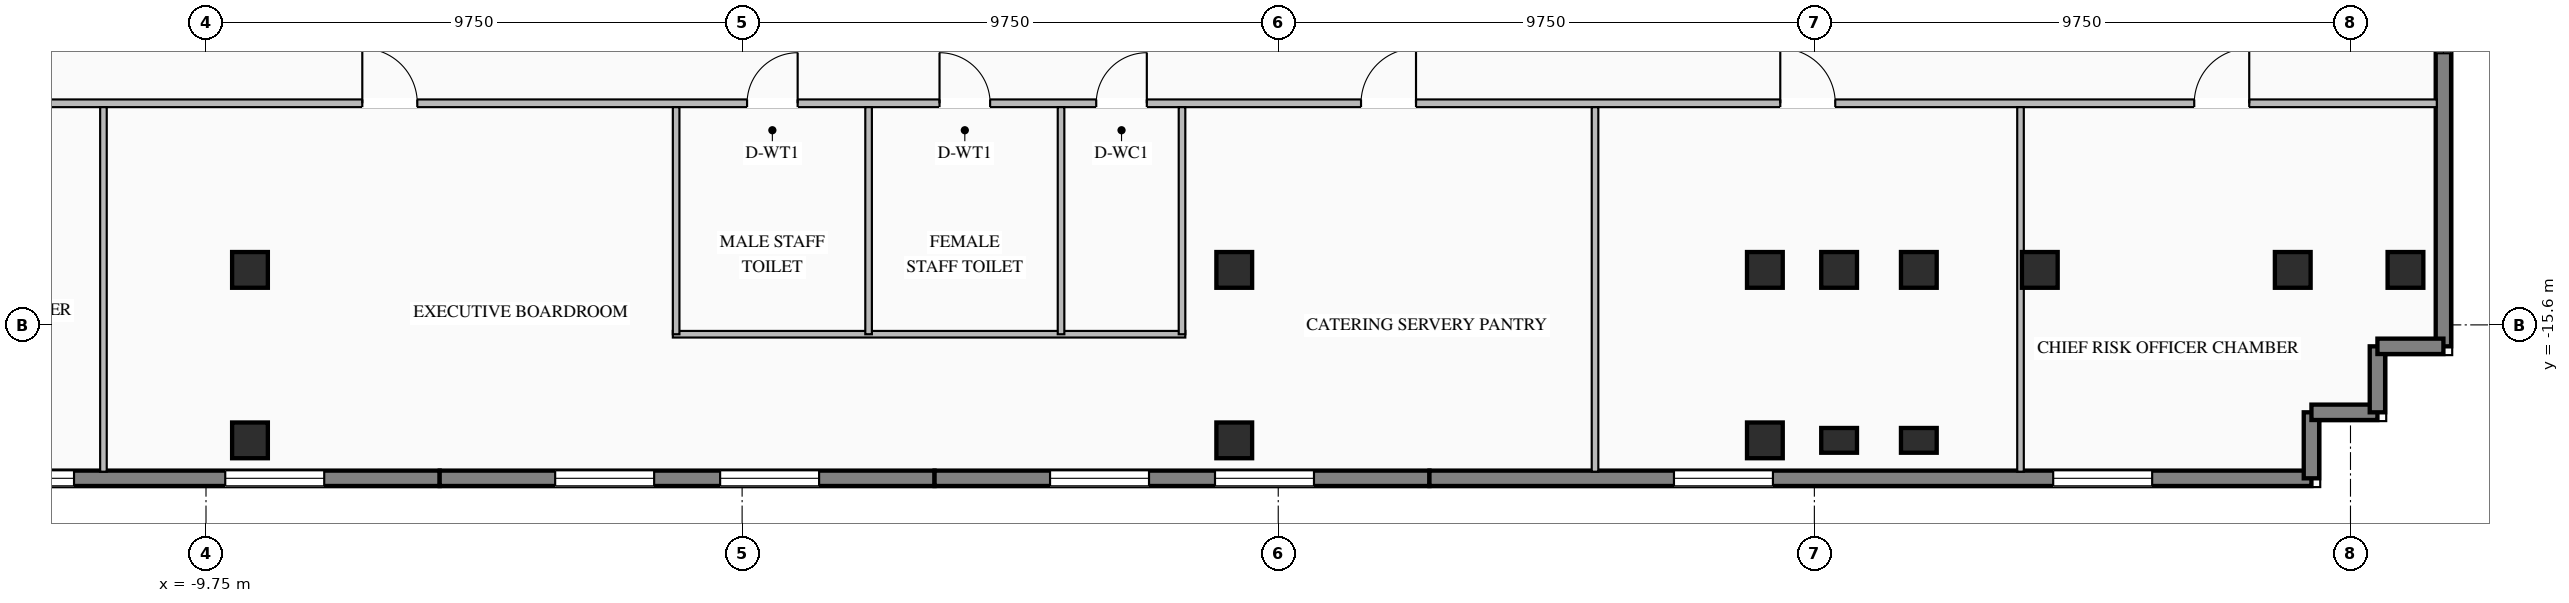
"""IFC4 building model, lengths in metres.
Left out: names, types, materials, properties, quantities, classifications, styles, units other than length and angle.
Written with IfcOpenShell. Run it as: python <this file> out.ifc"""

import sys

from ifc_helpers import new_model, si_unit, direction, frame, frame_2d, origin, origin_2d, place, context, subcontext, project, spatial, rectangle, i_section, extrude, element, fill, save


model = new_model("IFC4")
c1 = context("Model", 3, precision=1e-05, world=origin(), true_north=direction((0.0, 1.0)))
c2 = subcontext(c1, "Body", "Model", "MODEL_VIEW")
j1 = project(units=[si_unit("LENGTHUNIT", "METRE"), si_unit("PLANEANGLEUNIT", "RADIAN")], contexts=[c1])
p1 = place(None, origin())
s1 = spatial("IfcSite", under=j1, at=p1, CompositionType="ELEMENT")
p2 = place(p1, origin())
s2 = spatial("IfcBuilding", under=s1, at=p2, CompositionType="ELEMENT")
p3 = place(p2, frame((0.0, 0.0, 148.45)))
s3 = spatial("IfcBuildingStorey", under=s2, at=p3, CompositionType="ELEMENT", Elevation=148.45)
for number, where, z_axis, x_axis in (
    (1, (-8.95, -14.6, 0.0), (0.0, 0.0, 1.0), (1.0, 0.0, 0.0)),
    (2, (8.95, -14.6, 0.0), (0.0, 0.0, 1.0), (1.0, 0.0, 0.0)),
    (3, (18.6, -14.6, 0.0), (0.0, 0.0, 1.0), (1.0, 0.0, 0.0)),
    (4, (19.95, -14.6, 0.0), (0.0, 0.0, 1.0), (1.0, 0.0, 0.0)),
    (5, (21.4, -14.6, 0.0), (0.0, 0.0, 1.0), (1.0, 0.0, 0.0)),
    (6, (23.6, -14.6, 0.0), (0.0, 0.0, 1.0), (1.0, 0.0, 0.0)),
    (7, (28.2, -14.6, 0.0), (0.0, 0.0, 1.0), (1.0, 0.0, 0.0)),
    (8, (-8.95, -17.7, 0.0), (0.0, 0.0, 1.0), (1.0, 0.0, 0.0)),
    (9, (8.95, -17.7, 0.0), (0.0, 0.0, 1.0), (1.0, 0.0, 0.0)),
    (10, (18.6, -17.7, 0.0), (0.0, 0.0, 1.0), (1.0, 0.0, 0.0)),
    (11, (30.25, -14.6, 0.0), (0.0, 0.0, 1.0), (1.0, 0.0, 0.0)),
):
    element("IfcColumn", number, at=place(p3, frame(where, z_axis=z_axis, x_axis=x_axis)), inside=s3, PredefinedType="COLUMN", context=c2, shape_type="SweptSolid", body=[
        extrude(i_section(OverallWidth=0.65, OverallDepth=0.65, WebThickness=0.028, FlangeThickness=0.04, at=origin_2d()), origin(), (0.0, 0.0, 1.0), 3.45),
    ])
for number, where, z_axis, x_axis in (
    (12, (19.95, -17.7, 0.0), (0.0, 0.0, 1.0), (1.0, 0.0, 0.0)),
    (13, (21.4, -17.7, 0.0), (0.0, 0.0, 1.0), (1.0, 0.0, 0.0)),
):
    element("IfcColumn", number, at=place(p3, frame(where, z_axis=z_axis, x_axis=x_axis)), inside=s3, PredefinedType="PILASTER", context=c2, shape_type="SweptSolid", body=[
        extrude(rectangle(XDim=0.65, YDim=0.45, at=origin_2d()), origin(), (0.0, 0.0, 1.0), 3.45),
    ])
p4 = place(p3, frame((-5.5, -18.39, 0.0), z_axis=(0.0, 0.0, 1.0), x_axis=(-1.0, 0.0, 0.0)))
e14 = element("IfcWall", 14, at=p4, inside=s3, PredefinedType="STANDARD", context=c2, shape_type="SweptSolid", body=[
    extrude(rectangle(XDim=9.0, YDim=0.28, at=frame_2d((4.5, 0.0))), origin(), (0.0, 0.0, 1.0), 3.25),
])
p5 = place(p4, frame((2.1, 0.0, 0.76)))
e15 = element("IfcOpeningElement", 15, at=p5, cuts=e14, PredefinedType="OPENING", context=c2, shape_type="SweptSolid", body=[
    extrude(rectangle(XDim=1.8, YDim=1.95, at=frame_2d((0.9, 0.975))), frame((0.0, 0.15, 0.0), z_axis=(0.0, -1.0, 0.0), x_axis=(1.0, 0.0, 0.0)), (0.0, 0.0, 1.0), 0.3),
])
p6 = place(p4, frame((6.65, 0.0, 0.76)))
e16 = element("IfcOpeningElement", 16, at=p6, cuts=e14, PredefinedType="OPENING", context=c2, shape_type="SweptSolid", body=[
    extrude(rectangle(XDim=1.8, YDim=1.95, at=frame_2d((0.9, 0.975))), frame((0.0, 0.15, 0.0), z_axis=(0.0, -1.0, 0.0), x_axis=(1.0, 0.0, 0.0)), (0.0, 0.0, 1.0), 0.3),
])
p7 = place(p3, frame((3.5, -18.39, 0.0), z_axis=(0.0, 0.0, 1.0), x_axis=(-1.0, 0.0, 0.0)))
e17 = element("IfcWall", 17, at=p7, inside=s3, PredefinedType="STANDARD", context=c2, shape_type="SweptSolid", body=[
    extrude(rectangle(XDim=9.0, YDim=0.28, at=frame_2d((4.5, 0.0))), origin(), (0.0, 0.0, 1.0), 3.25),
])
p8 = place(p7, frame((2.1, 0.0, 0.76)))
e18 = element("IfcOpeningElement", 18, at=p8, cuts=e17, PredefinedType="OPENING", context=c2, shape_type="SweptSolid", body=[
    extrude(rectangle(XDim=1.8, YDim=1.95, at=frame_2d((0.9, 0.975))), frame((0.0, 0.15, 0.0), z_axis=(0.0, -1.0, 0.0), x_axis=(1.0, 0.0, 0.0)), (0.0, 0.0, 1.0), 0.3),
])
p9 = place(p7, frame((5.1, 0.0, 0.76)))
e19 = element("IfcOpeningElement", 19, at=p9, cuts=e17, PredefinedType="OPENING", context=c2, shape_type="SweptSolid", body=[
    extrude(rectangle(XDim=1.8, YDim=1.95, at=frame_2d((0.9, 0.975))), frame((0.0, 0.15, 0.0), z_axis=(0.0, -1.0, 0.0), x_axis=(1.0, 0.0, 0.0)), (0.0, 0.0, 1.0), 0.3),
])
p10 = place(p3, frame((12.5, -18.39, 0.0), z_axis=(0.0, 0.0, 1.0), x_axis=(-1.0, 0.0, 0.0)))
e20 = element("IfcWall", 20, at=p10, inside=s3, PredefinedType="STANDARD", context=c2, shape_type="SweptSolid", body=[
    extrude(rectangle(XDim=9.0, YDim=0.28, at=frame_2d((4.5, 0.0))), origin(), (0.0, 0.0, 1.0), 3.25),
])
p11 = place(p10, frame((2.1, 0.0, 0.76)))
e21 = element("IfcOpeningElement", 21, at=p11, cuts=e20, PredefinedType="OPENING", context=c2, shape_type="SweptSolid", body=[
    extrude(rectangle(XDim=1.8, YDim=1.95, at=frame_2d((0.9, 0.975))), frame((0.0, 0.15, 0.0), z_axis=(0.0, -1.0, 0.0), x_axis=(1.0, 0.0, 0.0)), (0.0, 0.0, 1.0), 0.3),
])
p12 = place(p10, frame((5.1, 0.0, 0.76)))
e22 = element("IfcOpeningElement", 22, at=p12, cuts=e20, PredefinedType="OPENING", context=c2, shape_type="SweptSolid", body=[
    extrude(rectangle(XDim=1.8, YDim=1.95, at=frame_2d((0.9, 0.975))), frame((0.0, 0.15, 0.0), z_axis=(0.0, -1.0, 0.0), x_axis=(1.0, 0.0, 0.0)), (0.0, 0.0, 1.0), 0.3),
])
p13 = place(p3, frame((28.54, -18.39, 0.0), z_axis=(0.0, 0.0, 1.0), x_axis=(-1.0, 0.0, 0.0)))
e23 = element("IfcWall", 23, at=p13, inside=s3, PredefinedType="STANDARD", context=c2, shape_type="SweptSolid", body=[
    extrude(rectangle(XDim=16.04, YDim=0.28, at=frame_2d((8.02, 0.0))), origin(), (0.0, 0.0, 1.0), 3.25),
])
p14 = place(p13, frame((2.897, 0.0, 0.76)))
e24 = element("IfcOpeningElement", 24, at=p14, cuts=e23, PredefinedType="OPENING", context=c2, shape_type="SweptSolid", body=[
    extrude(rectangle(XDim=1.8, YDim=1.95, at=frame_2d((0.9, 0.975))), frame((0.0, 0.15, 0.0), z_axis=(0.0, -1.0, 0.0), x_axis=(1.0, 0.0, 0.0)), (0.0, 0.0, 1.0), 0.3),
])
p15 = place(p13, frame((9.793, 0.0, 0.76)))
e25 = element("IfcOpeningElement", 25, at=p15, cuts=e23, PredefinedType="OPENING", context=c2, shape_type="SweptSolid", body=[
    extrude(rectangle(XDim=1.8, YDim=1.95, at=frame_2d((0.9, 0.975))), frame((0.0, 0.15, 0.0), z_axis=(0.0, -1.0, 0.0), x_axis=(1.0, 0.0, 0.0)), (0.0, 0.0, 1.0), 0.3),
])
p16 = place(p3, frame((30.94, 1.8, 0.0), z_axis=(0.0, 0.0, 1.0), x_axis=(0.0, -1.0, 0.0)))
e26 = element("IfcWall", 26, at=p16, inside=s3, PredefinedType="STANDARD", context=c2, shape_type="SweptSolid", body=[
    extrude(rectangle(XDim=17.79, YDim=0.28, at=frame_2d((8.895, 0.0))), origin(), (0.0, 0.0, 1.0), 3.25),
])
p17 = place(p16, frame((5.33, 0.0, 0.76)))
e27 = element("IfcOpeningElement", 27, at=p17, cuts=e26, PredefinedType="OPENING", context=c2, shape_type="SweptSolid", body=[
    extrude(rectangle(XDim=1.2, YDim=1.95, at=frame_2d((0.6, 0.975))), frame((0.0, 0.15, 0.0), z_axis=(0.0, -1.0, 0.0), x_axis=(1.0, 0.0, 0.0)), (0.0, 0.0, 1.0), 0.3),
])
p18 = place(p16, frame((11.26, 0.0, 0.76)))
e28 = element("IfcOpeningElement", 28, at=p18, cuts=e26, PredefinedType="OPENING", context=c2, shape_type="SweptSolid", body=[
    extrude(rectangle(XDim=1.2, YDim=1.95, at=frame_2d((0.6, 0.975))), frame((0.0, 0.15, 0.0), z_axis=(0.0, -1.0, 0.0), x_axis=(1.0, 0.0, 0.0)), (0.0, 0.0, 1.0), 0.3),
])
for number, where, z_axis, x_axis in (
    (29, (28.54, -18.39, 0.0), (0.0, 0.0, 1.0), (0.0, 1.0, 0.0)),
    (30, (28.54, -17.19, 0.0), (0.0, 0.0, 1.0), (1.0, 0.0, 0.0)),
    (31, (29.74, -17.19, 0.0), (0.0, 0.0, 1.0), (0.0, 1.0, 0.0)),
    (32, (29.74, -15.99, 0.0), (0.0, 0.0, 1.0), (1.0, 0.0, 0.0)),
):
    element("IfcWall", number, at=place(p3, frame(where, z_axis=z_axis, x_axis=x_axis)), inside=s3, PredefinedType="STANDARD", context=c2, shape_type="SweptSolid", body=[
        extrude(rectangle(XDim=1.2, YDim=0.28, at=frame_2d((0.6, 0.0))), origin(), (0.0, 0.0, 1.0), 3.25),
    ])
p19 = place(p3, frame((-32.82, -11.57, 0.0), z_axis=(0.0, 0.0, 1.0), x_axis=(1.0, 0.0, 0.0)))
e33 = element("IfcWall", 33, at=p19, inside=s3, PredefinedType="STANDARD", context=c2, shape_type="SweptSolid", body=[
    extrude(rectangle(XDim=63.64, YDim=0.14, at=frame_2d((31.82, 0.0))), origin(), (0.0, 0.0, 1.0), 3.25),
])
p20 = place(p19, frame((32.91, 0.0, 0.0)))
e34 = element("IfcOpeningElement", 34, at=p20, cuts=e33, PredefinedType="OPENING", context=c2, shape_type="SweptSolid", body=[
    extrude(rectangle(XDim=0.92, YDim=2.08, at=frame_2d((0.46, 1.04))), frame((0.0, 0.08, 0.0), z_axis=(0.0, -1.0, 0.0), x_axis=(1.0, 0.0, 0.0)), (0.0, 0.0, 1.0), 0.16),
])
p21 = place(p19, frame((36.41, 0.0, 0.0)))
e35 = element("IfcOpeningElement", 35, at=p21, cuts=e33, PredefinedType="OPENING", context=c2, shape_type="SweptSolid", body=[
    extrude(rectangle(XDim=0.92, YDim=2.08, at=frame_2d((0.46, 1.04))), frame((0.0, 0.08, 0.0), z_axis=(0.0, -1.0, 0.0), x_axis=(1.0, 0.0, 0.0)), (0.0, 0.0, 1.0), 0.16),
])
p22 = place(p19, frame((39.26, 0.0, 0.0)))
e36 = element("IfcOpeningElement", 36, at=p22, cuts=e33, PredefinedType="OPENING", context=c2, shape_type="SweptSolid", body=[
    extrude(rectangle(XDim=0.92, YDim=2.08, at=frame_2d((0.46, 1.04))), frame((0.0, 0.08, 0.0), z_axis=(0.0, -1.0, 0.0), x_axis=(1.0, 0.0, 0.0)), (0.0, 0.0, 1.0), 0.16),
])
p23 = place(p19, frame((4.864, 0.0, 0.0)))
e37 = element("IfcOpeningElement", 37, at=p23, cuts=e33, PredefinedType="OPENING", context=c2, shape_type="SweptSolid", body=[
    extrude(rectangle(XDim=1.0, YDim=2.08, at=frame_2d((0.5, 1.04))), frame((0.0, 0.08, 0.0), z_axis=(0.0, -1.0, 0.0), x_axis=(1.0, 0.0, 0.0)), (0.0, 0.0, 1.0), 0.16),
])
p24 = place(p19, frame((15.34, 0.0, 0.0)))
e38 = element("IfcOpeningElement", 38, at=p24, cuts=e33, PredefinedType="OPENING", context=c2, shape_type="SweptSolid", body=[
    extrude(rectangle(XDim=1.0, YDim=2.08, at=frame_2d((0.5, 1.04))), frame((0.0, 0.08, 0.0), z_axis=(0.0, -1.0, 0.0), x_axis=(1.0, 0.0, 0.0)), (0.0, 0.0, 1.0), 0.16),
])
p25 = place(p19, frame((25.913, 0.0, 0.0)))
e39 = element("IfcOpeningElement", 39, at=p25, cuts=e33, PredefinedType="OPENING", context=c2, shape_type="SweptSolid", body=[
    extrude(rectangle(XDim=1.0, YDim=2.08, at=frame_2d((0.5, 1.04))), frame((0.0, 0.08, 0.0), z_axis=(0.0, -1.0, 0.0), x_axis=(1.0, 0.0, 0.0)), (0.0, 0.0, 1.0), 0.16),
])
p26 = place(p19, frame((44.075, 0.0, 0.0)))
e40 = element("IfcOpeningElement", 40, at=p26, cuts=e33, PredefinedType="OPENING", context=c2, shape_type="SweptSolid", body=[
    extrude(rectangle(XDim=1.0, YDim=2.08, at=frame_2d((0.5, 1.04))), frame((0.0, 0.08, 0.0), z_axis=(0.0, -1.0, 0.0), x_axis=(1.0, 0.0, 0.0)), (0.0, 0.0, 1.0), 0.16),
])
p27 = place(p19, frame((51.7, 0.0, 0.0)))
e41 = element("IfcOpeningElement", 41, at=p27, cuts=e33, PredefinedType="OPENING", context=c2, shape_type="SweptSolid", body=[
    extrude(rectangle(XDim=1.0, YDim=2.08, at=frame_2d((0.5, 1.04))), frame((0.0, 0.08, 0.0), z_axis=(0.0, -1.0, 0.0), x_axis=(1.0, 0.0, 0.0)), (0.0, 0.0, 1.0), 0.16),
])
p28 = place(p19, frame((59.229, 0.0, 0.0)))
e42 = element("IfcOpeningElement", 42, at=p28, cuts=e33, PredefinedType="OPENING", context=c2, shape_type="SweptSolid", body=[
    extrude(rectangle(XDim=1.0, YDim=2.08, at=frame_2d((0.5, 1.04))), frame((0.0, 0.08, 0.0), z_axis=(0.0, -1.0, 0.0), x_axis=(1.0, 0.0, 0.0)), (0.0, 0.0, 1.0), 0.16),
])
p29 = place(p3, frame((-1.26, -15.77, 0.0), z_axis=(0.0, 0.0, 1.0), x_axis=(1.0, 0.0, 0.0)))
e43 = element("IfcWall", 43, at=p29, inside=s3, PredefinedType="STANDARD", context=c2, shape_type="SweptSolid", body=[
    extrude(rectangle(XDim=9.32, YDim=0.12, at=frame_2d((4.66, 0.0))), origin(), (0.0, 0.0, 1.0), 3.25),
])
for number, where, z_axis, x_axis in (
    (44, (-1.2, -15.77, 0.0), (0.0, 0.0, 1.0), (0.0, 1.0, 0.0)),
    (45, (2.3, -15.77, 0.0), (0.0, 0.0, 1.0), (0.0, 1.0, 0.0)),
    (46, (5.8, -15.77, 0.0), (0.0, 0.0, 1.0), (0.0, 1.0, 0.0)),
    (47, (8.0, -15.77, 0.0), (0.0, 0.0, 1.0), (0.0, 1.0, 0.0)),
):
    element("IfcWall", number, at=place(p3, frame(where, z_axis=z_axis, x_axis=x_axis)), inside=s3, PredefinedType="STANDARD", context=c2, shape_type="SweptSolid", body=[
        extrude(rectangle(XDim=4.13, YDim=0.12, at=frame_2d((2.065, 0.0))), origin(), (0.0, 0.0, 1.0), 3.25),
    ])
for number, where, z_axis, x_axis in (
    (48, (-11.615, -18.27, 0.0), (0.0, 0.0, 1.0), (0.0, 1.0, 0.0)),
    (49, (15.511, -18.27, 0.0), (0.0, 0.0, 1.0), (0.0, 1.0, 0.0)),
    (50, (23.249, -18.27, 0.0), (0.0, 0.0, 1.0), (0.0, 1.0, 0.0)),
):
    element("IfcWall", number, at=place(p3, frame(where, z_axis=z_axis, x_axis=x_axis)), inside=s3, PredefinedType="STANDARD", context=c2, shape_type="SweptSolid", body=[
        extrude(rectangle(XDim=6.63, YDim=0.12, at=frame_2d((3.315, 0.0))), origin(), (0.0, 0.0, 1.0), 3.25),
    ])
p30 = place(p5, origin())
e51 = element("IfcWindow", 51, at=p30, inside=s3, PartitioningType="SINGLE_PANEL", PredefinedType="WINDOW", context=c2, shape_type="SweptSolid", body=[
    extrude(rectangle(XDim=1.8, YDim=1.95, at=frame_2d((0.9, 0.975))), frame((0.0, 0.03, 0.0), z_axis=(0.0, -1.0, 0.0), x_axis=(1.0, 0.0, 0.0)), (0.0, 0.0, 1.0), 0.06),
])
fill(e15, e51)
p31 = place(p6, origin())
e52 = element("IfcWindow", 52, at=p31, inside=s3, PartitioningType="SINGLE_PANEL", PredefinedType="WINDOW", context=c2, shape_type="SweptSolid", body=[
    extrude(rectangle(XDim=1.8, YDim=1.95, at=frame_2d((0.9, 0.975))), frame((0.0, 0.03, 0.0), z_axis=(0.0, -1.0, 0.0), x_axis=(1.0, 0.0, 0.0)), (0.0, 0.0, 1.0), 0.06),
])
fill(e16, e52)
p32 = place(p8, origin())
e53 = element("IfcWindow", 53, at=p32, inside=s3, PartitioningType="SINGLE_PANEL", PredefinedType="WINDOW", context=c2, shape_type="SweptSolid", body=[
    extrude(rectangle(XDim=1.8, YDim=1.95, at=frame_2d((0.9, 0.975))), frame((0.0, 0.03, 0.0), z_axis=(0.0, -1.0, 0.0), x_axis=(1.0, 0.0, 0.0)), (0.0, 0.0, 1.0), 0.06),
])
fill(e18, e53)
p33 = place(p9, origin())
e54 = element("IfcWindow", 54, at=p33, inside=s3, PartitioningType="SINGLE_PANEL", PredefinedType="WINDOW", context=c2, shape_type="SweptSolid", body=[
    extrude(rectangle(XDim=1.8, YDim=1.95, at=frame_2d((0.9, 0.975))), frame((0.0, 0.03, 0.0), z_axis=(0.0, -1.0, 0.0), x_axis=(1.0, 0.0, 0.0)), (0.0, 0.0, 1.0), 0.06),
])
fill(e19, e54)
p34 = place(p11, origin())
e55 = element("IfcWindow", 55, at=p34, inside=s3, PartitioningType="SINGLE_PANEL", PredefinedType="WINDOW", context=c2, shape_type="SweptSolid", body=[
    extrude(rectangle(XDim=1.8, YDim=1.95, at=frame_2d((0.9, 0.975))), frame((0.0, 0.03, 0.0), z_axis=(0.0, -1.0, 0.0), x_axis=(1.0, 0.0, 0.0)), (0.0, 0.0, 1.0), 0.06),
])
fill(e21, e55)
p35 = place(p12, origin())
e56 = element("IfcWindow", 56, at=p35, inside=s3, PartitioningType="SINGLE_PANEL", PredefinedType="WINDOW", context=c2, shape_type="SweptSolid", body=[
    extrude(rectangle(XDim=1.8, YDim=1.95, at=frame_2d((0.9, 0.975))), frame((0.0, 0.03, 0.0), z_axis=(0.0, -1.0, 0.0), x_axis=(1.0, 0.0, 0.0)), (0.0, 0.0, 1.0), 0.06),
])
fill(e22, e56)
p36 = place(p14, origin())
e57 = element("IfcWindow", 57, at=p36, inside=s3, PartitioningType="SINGLE_PANEL", PredefinedType="WINDOW", context=c2, shape_type="SweptSolid", body=[
    extrude(rectangle(XDim=1.8, YDim=1.95, at=frame_2d((0.9, 0.975))), frame((0.0, 0.03, 0.0), z_axis=(0.0, -1.0, 0.0), x_axis=(1.0, 0.0, 0.0)), (0.0, 0.0, 1.0), 0.06),
])
fill(e24, e57)
p37 = place(p15, origin())
e58 = element("IfcWindow", 58, at=p37, inside=s3, PartitioningType="SINGLE_PANEL", PredefinedType="WINDOW", context=c2, shape_type="SweptSolid", body=[
    extrude(rectangle(XDim=1.8, YDim=1.95, at=frame_2d((0.9, 0.975))), frame((0.0, 0.03, 0.0), z_axis=(0.0, -1.0, 0.0), x_axis=(1.0, 0.0, 0.0)), (0.0, 0.0, 1.0), 0.06),
])
fill(e25, e58)
p38 = place(p18, origin())
e59 = element("IfcWindow", 59, at=p38, inside=s3, PartitioningType="SINGLE_PANEL", PredefinedType="WINDOW", context=c2, shape_type="SweptSolid", body=[
    extrude(rectangle(XDim=1.2, YDim=1.95, at=frame_2d((0.6, 0.975))), frame((0.0, 0.03, 0.0), z_axis=(0.0, -1.0, 0.0), x_axis=(1.0, 0.0, 0.0)), (0.0, 0.0, 1.0), 0.06),
])
fill(e28, e59)
p39 = place(p20, origin())
e60 = element("IfcDoor", 60, at=p39, inside=s3, OperationType="SINGLE_SWING_RIGHT", PredefinedType="DOOR", context=c2, shape_type="SweptSolid", body=[
    extrude(rectangle(XDim=0.92, YDim=2.08, at=frame_2d((0.46, 1.04))), frame((0.0, 0.025, 0.0), z_axis=(0.0, -1.0, 0.0), x_axis=(1.0, 0.0, 0.0)), (0.0, 0.0, 1.0), 0.05),
])
fill(e34, e60)
p40 = place(p21, origin())
e61 = element("IfcDoor", 61, at=p40, inside=s3, OperationType="SINGLE_SWING_LEFT", PredefinedType="DOOR", context=c2, shape_type="SweptSolid", body=[
    extrude(rectangle(XDim=0.92, YDim=2.08, at=frame_2d((0.46, 1.04))), frame((0.0, 0.025, 0.0), z_axis=(0.0, -1.0, 0.0), x_axis=(1.0, 0.0, 0.0)), (0.0, 0.0, 1.0), 0.05),
])
fill(e35, e61)
p41 = place(p22, origin())
e62 = element("IfcDoor", 62, at=p41, inside=s3, OperationType="SINGLE_SWING_RIGHT", PredefinedType="DOOR", context=c2, shape_type="SweptSolid", body=[
    extrude(rectangle(XDim=0.92, YDim=2.08, at=frame_2d((0.46, 1.04))), frame((0.0, 0.025, 0.0), z_axis=(0.0, -1.0, 0.0), x_axis=(1.0, 0.0, 0.0)), (0.0, 0.0, 1.0), 0.05),
])
fill(e36, e62)
p42 = place(p25, origin())
e63 = element("IfcDoor", 63, at=p42, inside=s3, OperationType="SINGLE_SWING_LEFT", PredefinedType="DOOR", context=c2, shape_type="SweptSolid", body=[
    extrude(rectangle(XDim=1.0, YDim=2.08, at=frame_2d((0.5, 1.04))), frame((0.0, 0.025, 0.0), z_axis=(0.0, -1.0, 0.0), x_axis=(1.0, 0.0, 0.0)), (0.0, 0.0, 1.0), 0.05),
])
fill(e39, e63)
p43 = place(p26, origin())
e64 = element("IfcDoor", 64, at=p43, inside=s3, OperationType="SINGLE_SWING_RIGHT", PredefinedType="DOOR", context=c2, shape_type="SweptSolid", body=[
    extrude(rectangle(XDim=1.0, YDim=2.08, at=frame_2d((0.5, 1.04))), frame((0.0, 0.025, 0.0), z_axis=(0.0, -1.0, 0.0), x_axis=(1.0, 0.0, 0.0)), (0.0, 0.0, 1.0), 0.05),
])
fill(e40, e64)
p44 = place(p27, origin())
e65 = element("IfcDoor", 65, at=p44, inside=s3, OperationType="SINGLE_SWING_LEFT", PredefinedType="DOOR", context=c2, shape_type="SweptSolid", body=[
    extrude(rectangle(XDim=1.0, YDim=2.08, at=frame_2d((0.5, 1.04))), frame((0.0, 0.025, 0.0), z_axis=(0.0, -1.0, 0.0), x_axis=(1.0, 0.0, 0.0)), (0.0, 0.0, 1.0), 0.05),
])
fill(e41, e65)
p45 = place(p28, origin())
e66 = element("IfcDoor", 66, at=p45, inside=s3, OperationType="SINGLE_SWING_RIGHT", PredefinedType="DOOR", context=c2, shape_type="SweptSolid", body=[
    extrude(rectangle(XDim=1.0, YDim=2.08, at=frame_2d((0.5, 1.04))), frame((0.0, 0.025, 0.0), z_axis=(0.0, -1.0, 0.0), x_axis=(1.0, 0.0, 0.0)), (0.0, 0.0, 1.0), 0.05),
])
fill(e42, e66)
save(model, sys.argv[1])
